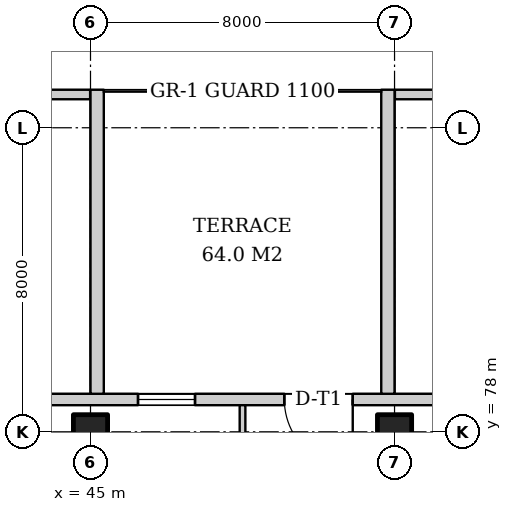
"""IFC4 building model, lengths in metres.
Left out: names, types, materials, properties, quantities, classifications, styles, units other than length and angle.
Written with IfcOpenShell. Run it as: python <this file> out.ifc"""

import sys

from ifc_helpers import new_model, si_unit, direction, frame, frame_2d, origin, origin_2d, place, context, subcontext, project, spatial, rectangle, extrude, element, fill, save


model = new_model("IFC4")
c1 = context("Model", 3, precision=1e-05, world=origin(), true_north=direction((0.0, 1.0)))
c2 = subcontext(c1, "Body", "Model", "MODEL_VIEW")
j1 = project(units=[si_unit("LENGTHUNIT", "METRE"), si_unit("PLANEANGLEUNIT", "RADIAN")], contexts=[c1])
p1 = place(None, origin())
s1 = spatial("IfcSite", under=j1, at=p1, CompositionType="ELEMENT")
p2 = place(p1, origin())
s2 = spatial("IfcBuilding", under=s1, at=p2, CompositionType="ELEMENT")
p3 = place(p2, frame((0.0, 0.0, 11.0)))
s3 = spatial("IfcBuildingStorey", under=s2, at=p3, CompositionType="ELEMENT", Elevation=11.0)
for number, where, z_axis, x_axis in (
    (1, (45.0, 78.0, 0.0), (0.0, 0.0, 1.0), (1.0, 0.0, 0.0)),
    (2, (53.0, 78.0, 0.0), (0.0, 0.0, 1.0), (1.0, 0.0, 0.0)),
):
    element("IfcColumn", number, at=place(p3, frame(where, z_axis=z_axis, x_axis=x_axis)), inside=s3, PredefinedType="COLUMN", context=c2, shape_type="SweptSolid", body=[
        extrude(rectangle(XDim=0.9, YDim=0.9, at=origin_2d()), origin(), (0.0, 0.0, 1.0), 5.0),
    ])
p4 = place(p3, frame((78.0, 78.85, 0.0), z_axis=(0.0, 0.0, 1.0), x_axis=(-1.0, 0.0, 0.0)))
e3 = element("IfcWall", 3, at=p4, inside=s3, PredefinedType="SOLIDWALL", context=c2, shape_type="SweptSolid", body=[
    extrude(rectangle(XDim=58.0, YDim=0.3, at=frame_2d((29.0, 0.0))), origin(), (0.0, 0.0, 1.0), 4.7),
])
p5 = place(p4, frame((1.5, 0.0, 0.9)))
e4 = element("IfcOpeningElement", 4, at=p5, cuts=e3, PredefinedType="OPENING", context=c2, shape_type="SweptSolid", body=[
    extrude(rectangle(XDim=1.5, YDim=3.2, at=frame_2d((0.75, 1.6))), frame((0.0, 0.16, 0.0), z_axis=(0.0, -1.0, 0.0), x_axis=(1.0, 0.0, 0.0)), (0.0, 0.0, 1.0), 0.32),
])
p6 = place(p4, frame((6.0, 0.0, 0.9)))
e5 = element("IfcOpeningElement", 5, at=p6, cuts=e3, PredefinedType="OPENING", context=c2, shape_type="SweptSolid", body=[
    extrude(rectangle(XDim=1.5, YDim=3.2, at=frame_2d((0.75, 1.6))), frame((0.0, 0.16, 0.0), z_axis=(0.0, -1.0, 0.0), x_axis=(1.0, 0.0, 0.0)), (0.0, 0.0, 1.0), 0.32),
])
p7 = place(p4, frame((10.25, 0.0, 0.9)))
e6 = element("IfcOpeningElement", 6, at=p7, cuts=e3, PredefinedType="OPENING", context=c2, shape_type="SweptSolid", body=[
    extrude(rectangle(XDim=1.5, YDim=3.2, at=frame_2d((0.75, 1.6))), frame((0.0, 0.16, 0.0), z_axis=(0.0, -1.0, 0.0), x_axis=(1.0, 0.0, 0.0)), (0.0, 0.0, 1.0), 0.32),
])
p8 = place(p4, frame((14.25, 0.0, 0.9)))
e7 = element("IfcOpeningElement", 7, at=p8, cuts=e3, PredefinedType="OPENING", context=c2, shape_type="SweptSolid", body=[
    extrude(rectangle(XDim=1.5, YDim=3.2, at=frame_2d((0.75, 1.6))), frame((0.0, 0.16, 0.0), z_axis=(0.0, -1.0, 0.0), x_axis=(1.0, 0.0, 0.0)), (0.0, 0.0, 1.0), 0.32),
])
p9 = place(p4, frame((18.25, 0.0, 0.9)))
e8 = element("IfcOpeningElement", 8, at=p9, cuts=e3, PredefinedType="OPENING", context=c2, shape_type="SweptSolid", body=[
    extrude(rectangle(XDim=1.5, YDim=3.2, at=frame_2d((0.75, 1.6))), frame((0.0, 0.16, 0.0), z_axis=(0.0, -1.0, 0.0), x_axis=(1.0, 0.0, 0.0)), (0.0, 0.0, 1.0), 0.32),
])
p10 = place(p4, frame((22.25, 0.0, 0.9)))
e9 = element("IfcOpeningElement", 9, at=p10, cuts=e3, PredefinedType="OPENING", context=c2, shape_type="SweptSolid", body=[
    extrude(rectangle(XDim=1.5, YDim=3.2, at=frame_2d((0.75, 1.6))), frame((0.0, 0.16, 0.0), z_axis=(0.0, -1.0, 0.0), x_axis=(1.0, 0.0, 0.0)), (0.0, 0.0, 1.0), 0.32),
])
p11 = place(p4, frame((26.1, 0.0, 0.0)))
e10 = element("IfcOpeningElement", 10, at=p11, cuts=e3, PredefinedType="OPENING", context=c2, shape_type="SweptSolid", body=[
    extrude(rectangle(XDim=1.8, YDim=2.4, at=frame_2d((0.9, 1.2))), frame((0.0, 0.16, 0.0), z_axis=(0.0, -1.0, 0.0), x_axis=(1.0, 0.0, 0.0)), (0.0, 0.0, 1.0), 0.32),
])
p12 = place(p4, frame((30.25, 0.0, 0.9)))
e11 = element("IfcOpeningElement", 11, at=p12, cuts=e3, PredefinedType="OPENING", context=c2, shape_type="SweptSolid", body=[
    extrude(rectangle(XDim=1.5, YDim=3.2, at=frame_2d((0.75, 1.6))), frame((0.0, 0.16, 0.0), z_axis=(0.0, -1.0, 0.0), x_axis=(1.0, 0.0, 0.0)), (0.0, 0.0, 1.0), 0.32),
])
p13 = place(p4, frame((34.25, 0.0, 0.9)))
e12 = element("IfcOpeningElement", 12, at=p13, cuts=e3, PredefinedType="OPENING", context=c2, shape_type="SweptSolid", body=[
    extrude(rectangle(XDim=1.5, YDim=3.2, at=frame_2d((0.75, 1.6))), frame((0.0, 0.16, 0.0), z_axis=(0.0, -1.0, 0.0), x_axis=(1.0, 0.0, 0.0)), (0.0, 0.0, 1.0), 0.32),
])
p14 = place(p4, frame((38.25, 0.0, 0.9)))
e13 = element("IfcOpeningElement", 13, at=p14, cuts=e3, PredefinedType="OPENING", context=c2, shape_type="SweptSolid", body=[
    extrude(rectangle(XDim=1.5, YDim=3.2, at=frame_2d((0.75, 1.6))), frame((0.0, 0.16, 0.0), z_axis=(0.0, -1.0, 0.0), x_axis=(1.0, 0.0, 0.0)), (0.0, 0.0, 1.0), 0.32),
])
p15 = place(p4, frame((42.25, 0.0, 0.9)))
e14 = element("IfcOpeningElement", 14, at=p15, cuts=e3, PredefinedType="OPENING", context=c2, shape_type="SweptSolid", body=[
    extrude(rectangle(XDim=1.5, YDim=3.2, at=frame_2d((0.75, 1.6))), frame((0.0, 0.16, 0.0), z_axis=(0.0, -1.0, 0.0), x_axis=(1.0, 0.0, 0.0)), (0.0, 0.0, 1.0), 0.32),
])
p16 = place(p4, frame((46.25, 0.0, 0.9)))
e15 = element("IfcOpeningElement", 15, at=p16, cuts=e3, PredefinedType="OPENING", context=c2, shape_type="SweptSolid", body=[
    extrude(rectangle(XDim=1.5, YDim=3.2, at=frame_2d((0.75, 1.6))), frame((0.0, 0.16, 0.0), z_axis=(0.0, -1.0, 0.0), x_axis=(1.0, 0.0, 0.0)), (0.0, 0.0, 1.0), 0.32),
])
p17 = place(p4, frame((50.5, 0.0, 0.9)))
e16 = element("IfcOpeningElement", 16, at=p17, cuts=e3, PredefinedType="OPENING", context=c2, shape_type="SweptSolid", body=[
    extrude(rectangle(XDim=1.5, YDim=3.2, at=frame_2d((0.75, 1.6))), frame((0.0, 0.16, 0.0), z_axis=(0.0, -1.0, 0.0), x_axis=(1.0, 0.0, 0.0)), (0.0, 0.0, 1.0), 0.32),
])
p18 = place(p4, frame((55.0, 0.0, 0.9)))
e17 = element("IfcOpeningElement", 17, at=p18, cuts=e3, PredefinedType="OPENING", context=c2, shape_type="SweptSolid", body=[
    extrude(rectangle(XDim=1.5, YDim=3.2, at=frame_2d((0.75, 1.6))), frame((0.0, 0.16, 0.0), z_axis=(0.0, -1.0, 0.0), x_axis=(1.0, 0.0, 0.0)), (0.0, 0.0, 1.0), 0.32),
])
p19 = place(p3, frame((12.0, 86.875, 0.0), z_axis=(0.0, 0.0, 1.0), x_axis=(1.0, 0.0, 0.0)))
e18 = element("IfcWall", 18, at=p19, inside=s3, PredefinedType="PARAPET", context=c2, shape_type="SweptSolid", body=[
    extrude(rectangle(XDim=32.99, YDim=0.25, at=frame_2d((16.495, 0.0))), origin(), (0.0, 0.0, 1.0), 1.1),
])
p20 = place(p3, frame((53.01, 86.875, 0.0), z_axis=(0.0, 0.0, 1.0), x_axis=(1.0, 0.0, 0.0)))
e19 = element("IfcWall", 19, at=p20, inside=s3, PredefinedType="PARAPET", context=c2, shape_type="SweptSolid", body=[
    extrude(rectangle(XDim=24.99, YDim=0.25, at=frame_2d((12.495, 0.0))), origin(), (0.0, 0.0, 1.0), 1.1),
])
for number, where, z_axis, x_axis in (
    (20, (45.175, 79.0, 0.0), (0.0, 0.0, 1.0), (0.0, 1.0, 0.0)),
    (21, (52.825, 79.0, 0.0), (0.0, 0.0, 1.0), (0.0, 1.0, 0.0)),
):
    element("IfcWall", number, at=place(p3, frame(where, z_axis=z_axis, x_axis=x_axis)), inside=s3, PredefinedType="PARAPET", context=c2, shape_type="SweptSolid", body=[
        extrude(rectangle(XDim=8.0, YDim=0.35, at=frame_2d((4.0, 0.0))), origin(), (0.0, 0.0, 1.0), 1.1),
    ])
p21 = place(p3, frame((49.0, 71.375, 0.0), z_axis=(0.0, 0.0, 1.0), x_axis=(0.0, 1.0, 0.0)))
e22 = element("IfcWall", 22, at=p21, inside=s3, PredefinedType="PARTITIONING", context=c2, shape_type="SweptSolid", body=[
    extrude(rectangle(XDim=7.325, YDim=0.15, at=frame_2d((3.663, 0.0))), origin(), (0.0, 0.0, 1.0), 3.2),
])
p22 = place(p11, origin())
e23 = element("IfcDoor", 23, at=p22, inside=s3, OperationType="DOUBLE_DOOR_SINGLE_SWING", PredefinedType="DOOR", context=c2, shape_type="SweptSolid", body=[
    extrude(rectangle(XDim=1.8, YDim=2.4, at=frame_2d((0.9, 1.2))), frame((0.0, 0.025, 0.0), z_axis=(0.0, -1.0, 0.0), x_axis=(1.0, 0.0, 0.0)), (0.0, 0.0, 1.0), 0.05),
])
fill(e10, e23)
p23 = place(p12, origin())
e24 = element("IfcWindow", 24, at=p23, inside=s3, PartitioningType="SINGLE_PANEL", PredefinedType="WINDOW", context=c2, shape_type="SweptSolid", body=[
    extrude(rectangle(XDim=1.5, YDim=3.2, at=frame_2d((0.75, 1.6))), frame((0.0, 0.03, 0.0), z_axis=(0.0, -1.0, 0.0), x_axis=(1.0, 0.0, 0.0)), (0.0, 0.0, 1.0), 0.06),
])
fill(e11, e24)
save(model, sys.argv[1])
